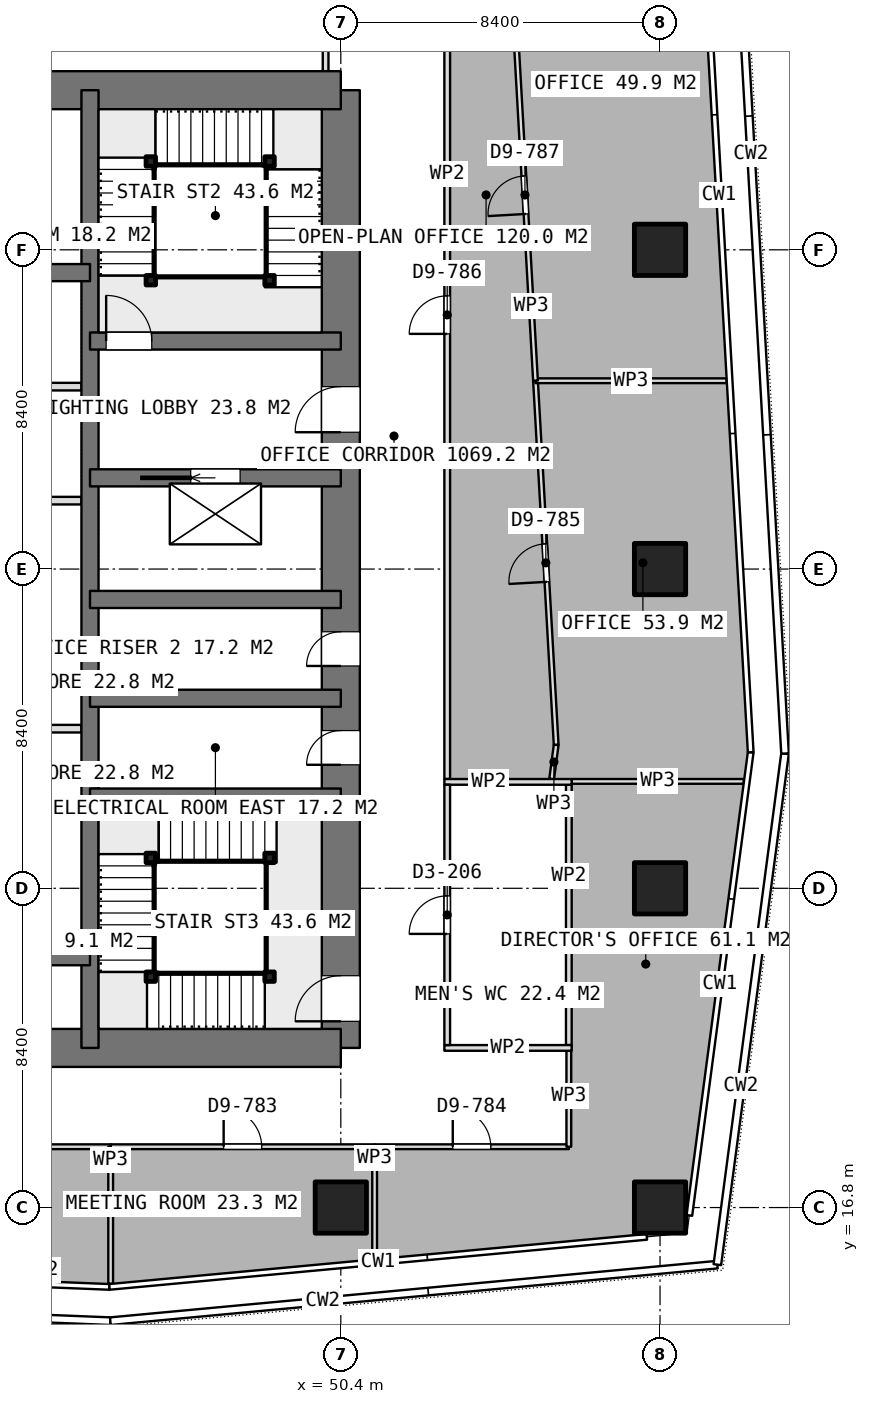
"""IFC4 building model, lengths in metres.
Left out: names, types, materials, properties, quantities, classifications, styles, units other than length and angle.
Written with IfcOpenShell. Run it as: python <this file> out.ifc"""

import sys

from ifc_helpers import new_model, si_unit, direction, frame, frame_2d, origin, origin_2d, place, context, subcontext, project, spatial, rectangle, extrude, element, fill, save


model = new_model("IFC4")
c1 = context("Model", 3, precision=1e-05, world=origin(), true_north=direction((0.0, 1.0)))
c2 = subcontext(c1, "Body", "Model", "MODEL_VIEW")
j1 = project(units=[si_unit("LENGTHUNIT", "METRE"), si_unit("PLANEANGLEUNIT", "RADIAN")], contexts=[c1])
p1 = place(None, origin())
s1 = spatial("IfcSite", under=j1, at=p1, CompositionType="ELEMENT")
p2 = place(p1, origin())
s2 = spatial("IfcBuilding", under=s1, at=p2, CompositionType="ELEMENT")
p3 = place(p2, frame((0.0, 0.0, 195.2)))
s3 = spatial("IfcBuildingStorey", under=s2, at=p3, CompositionType="ELEMENT", Elevation=195.2)
for number, where, z_axis, x_axis in (
    (1, (40.0, 21.0, 0.0), (0.0, 0.0, 1.0), (1.0, 0.0, 0.0)),
    (2, (40.0, 46.2, 0.0), (0.0, 0.0, 1.0), (1.0, 0.0, 0.0)),
):
    element("IfcWall", number, at=place(p3, frame(where, z_axis=z_axis, x_axis=x_axis)), inside=s3, PredefinedType="SHEAR", context=c2, shape_type="SweptSolid", body=[
        extrude(rectangle(XDim=10.4, YDim=1.0, at=frame_2d((5.2, 0.0))), origin(), (0.0, 0.0, 1.0), 3.75),
    ])
p4 = place(p3, frame((50.4, 21.0, 0.0), z_axis=(0.0, 0.0, 1.0), x_axis=(0.0, 1.0, 0.0)))
e3 = element("IfcWall", 3, at=p4, inside=s3, PredefinedType="SHEAR", context=c2, shape_type="SweptSolid", body=[
    extrude(rectangle(XDim=25.2, YDim=1.0, at=frame_2d((12.6, 0.0))), origin(), (0.0, 0.0, 1.0), 3.75),
])
p5 = place(p4, frame((16.2, 0.0, 0.0)))
e4 = element("IfcOpeningElement", 4, at=p5, cuts=e3, PredefinedType="OPENING", context=c2, shape_type="SweptSolid", body=[
    extrude(rectangle(XDim=1.2, YDim=2.1, at=frame_2d((0.6, 1.05))), frame((0.0, 0.51, 0.0), z_axis=(0.0, -1.0, 0.0), x_axis=(1.0, 0.0, 0.0)), (0.0, 0.0, 1.0), 1.02),
])
p6 = place(p4, frame((10.05, 0.0, 0.0)))
e5 = element("IfcOpeningElement", 5, at=p6, cuts=e3, PredefinedType="OPENING", context=c2, shape_type="SweptSolid", body=[
    extrude(rectangle(XDim=0.9, YDim=2.1, at=frame_2d((0.45, 1.05))), frame((0.0, 0.51, 0.0), z_axis=(0.0, -1.0, 0.0), x_axis=(1.0, 0.0, 0.0)), (0.0, 0.0, 1.0), 1.02),
])
p7 = place(p4, frame((7.45, 0.0, 0.0)))
e6 = element("IfcOpeningElement", 6, at=p7, cuts=e3, PredefinedType="OPENING", context=c2, shape_type="SweptSolid", body=[
    extrude(rectangle(XDim=0.9, YDim=2.1, at=frame_2d((0.45, 1.05))), frame((0.0, 0.51, 0.0), z_axis=(0.0, -1.0, 0.0), x_axis=(1.0, 0.0, 0.0)), (0.0, 0.0, 1.0), 1.02),
])
p8 = place(p4, frame((0.7, 0.0, 0.0)))
e7 = element("IfcOpeningElement", 7, at=p8, cuts=e3, PredefinedType="OPENING", context=c2, shape_type="SweptSolid", body=[
    extrude(rectangle(XDim=1.2, YDim=2.1, at=frame_2d((0.6, 1.05))), frame((0.0, 0.51, 0.0), z_axis=(0.0, -1.0, 0.0), x_axis=(1.0, 0.0, 0.0)), (0.0, 0.0, 1.0), 1.02),
])
p9 = place(p3, frame((43.8, 21.0, 0.0), z_axis=(0.0, 0.0, 1.0), x_axis=(0.0, 1.0, 0.0)))
e8 = element("IfcWall", 8, at=p9, inside=s3, PredefinedType="SHEAR", context=c2, shape_type="SweptSolid", body=[
    extrude(rectangle(XDim=25.2, YDim=0.45, at=frame_2d((12.6, 0.0))), origin(), (0.0, 0.0, 1.0), 3.75),
])
for number, where, z_axis, x_axis in (
    (9, (40.0, 23.4, 0.0), (0.0, 0.0, 1.0), (1.0, 0.0, 0.0)),
    (10, (40.0, 41.4, 0.0), (0.0, 0.0, 1.0), (1.0, 0.0, 0.0)),
):
    element("IfcWall", number, at=place(p3, frame(where, z_axis=z_axis, x_axis=x_axis)), inside=s3, PredefinedType="SHEAR", context=c2, shape_type="SweptSolid", body=[
        extrude(rectangle(XDim=3.8, YDim=0.45, at=frame_2d((1.9, 0.0))), origin(), (0.0, 0.0, 1.0), 3.75),
    ])
for number, where, z_axis, x_axis in (
    (11, (43.8, 27.6, 0.0), (0.0, 0.0, 1.0), (1.0, 0.0, 0.0)),
    (12, (43.8, 30.2, 0.0), (0.0, 0.0, 1.0), (1.0, 0.0, 0.0)),
    (13, (43.8, 32.8, 0.0), (0.0, 0.0, 1.0), (1.0, 0.0, 0.0)),
):
    element("IfcWall", number, at=place(p3, frame(where, z_axis=z_axis, x_axis=x_axis)), inside=s3, PredefinedType="SHEAR", context=c2, shape_type="SweptSolid", body=[
        extrude(rectangle(XDim=6.6, YDim=0.45, at=frame_2d((3.3, 0.0))), origin(), (0.0, 0.0, 1.0), 3.75),
    ])
p10 = place(p3, frame((43.8, 36.0, 0.0), z_axis=(0.0, 0.0, 1.0), x_axis=(1.0, 0.0, 0.0)))
e14 = element("IfcWall", 14, at=p10, inside=s3, PredefinedType="SHEAR", context=c2, shape_type="SweptSolid", body=[
    extrude(rectangle(XDim=6.6, YDim=0.45, at=frame_2d((3.3, 0.0))), origin(), (0.0, 0.0, 1.0), 3.75),
])
p11 = place(p10, frame((2.65, 0.0, 0.0)))
e15 = element("IfcOpeningElement", 15, at=p11, cuts=e14, PredefinedType="OPENING", context=c2, shape_type="SweptSolid", body=[
    extrude(rectangle(XDim=1.3, YDim=2.1, at=frame_2d((0.65, 1.05))), frame((0.0, 0.235, 0.0), z_axis=(0.0, -1.0, 0.0), x_axis=(1.0, 0.0, 0.0)), (0.0, 0.0, 1.0), 0.47),
])
p12 = place(p3, frame((43.8, 39.6, 0.0), z_axis=(0.0, 0.0, 1.0), x_axis=(1.0, 0.0, 0.0)))
e16 = element("IfcWall", 16, at=p12, inside=s3, PredefinedType="SHEAR", context=c2, shape_type="SweptSolid", body=[
    extrude(rectangle(XDim=6.6, YDim=0.45, at=frame_2d((3.3, 0.0))), origin(), (0.0, 0.0, 1.0), 3.75),
])
p13 = place(p12, frame((0.425, 0.0, 0.0)))
e17 = element("IfcOpeningElement", 17, at=p13, cuts=e16, PredefinedType="OPENING", context=c2, shape_type="SweptSolid", body=[
    extrude(rectangle(XDim=1.2, YDim=2.1, at=frame_2d((0.6, 1.05))), frame((0.0, 0.235, 0.0), z_axis=(0.0, -1.0, 0.0), x_axis=(1.0, 0.0, 0.0)), (0.0, 0.0, 1.0), 0.47),
])
for number, where, z_axis, x_axis in (
    (18, (50.4, 16.8, 0.0), (0.0, 0.0, 1.0), (1.0, 0.0, 0.0)),
    (19, (58.8, 16.8, 0.0), (0.0, 0.0, 1.0), (1.0, 0.0, 0.0)),
    (20, (58.8, 25.2, 0.0), (0.0, 0.0, 1.0), (1.0, 0.0, 0.0)),
    (21, (58.8, 33.6, 0.0), (0.0, 0.0, 1.0), (1.0, 0.0, 0.0)),
    (22, (58.8, 42.0, 0.0), (0.0, 0.0, 1.0), (1.0, 0.0, 0.0)),
):
    element("IfcColumn", number, at=place(p3, frame(where, z_axis=z_axis, x_axis=x_axis)), inside=s3, PredefinedType="COLUMN", context=c2, shape_type="SweptSolid", body=[
        extrude(rectangle(XDim=1.35, YDim=1.35, at=origin_2d()), origin(), (0.0, 0.0, 1.0), 3.75),
    ])
for number, where, z_axis, x_axis in (
    (23, (40.225, 29.4, 0.0), (0.0, 0.0, 1.0), (1.0, 0.0, 0.0)),
    (24, (40.225, 35.4, 0.0), (0.0, 0.0, 1.0), (1.0, 0.0, 0.0)),
    (25, (40.225, 38.4, 0.0), (0.0, 0.0, 1.0), (1.0, 0.0, 0.0)),
):
    element("IfcWall", number, at=place(p3, frame(where, z_axis=z_axis, x_axis=x_axis)), inside=s3, PredefinedType="PARTITIONING", context=c2, shape_type="SweptSolid", body=[
        extrude(rectangle(XDim=3.35, YDim=0.2, at=frame_2d((1.675, 0.0))), origin(), (0.0, 0.0, 1.0), 3.5),
    ])
p14 = place(p3, frame((50.0, 46.7, 0.0), z_axis=(0.0, 0.0, 1.0), x_axis=(0.0, 1.0, 0.0)))
e26 = element("IfcWall", 26, at=p14, inside=s3, PredefinedType="PARTITIONING", context=c2, shape_type="SweptSolid", body=[
    extrude(rectangle(XDim=2.625, YDim=0.15, at=frame_2d((1.312, 0.0))), origin(), (0.0, 0.0, 1.0), 3.5),
])
for number, where, z_axis, x_axis in (
    (27, (53.125, 21.0, 0.0), (0.0, 0.0, 1.0), (1.0, 0.0, 0.0)),
    (28, (53.125, 28.0, 0.0), (0.0, 0.0, 1.0), (1.0, 0.0, 0.0)),
):
    element("IfcWall", number, at=place(p3, frame(where, z_axis=z_axis, x_axis=x_axis)), inside=s3, PredefinedType="PARTITIONING", context=c2, shape_type="SweptSolid", body=[
        extrude(rectangle(XDim=3.35, YDim=0.15, at=frame_2d((1.675, 0.0))), origin(), (0.0, 0.0, 1.0), 3.5),
    ])
p15 = place(p3, frame((53.2, 21.075, 0.0), z_axis=(0.0, 0.0, 1.0), x_axis=(0.0, 1.0, 0.0)))
e29 = element("IfcWall", 29, at=p15, inside=s3, PredefinedType="PARTITIONING", context=c2, shape_type="SweptSolid", body=[
    extrude(rectangle(XDim=6.85, YDim=0.15, at=frame_2d((3.425, 0.0))), origin(), (0.0, 0.0, 1.0), 3.5),
])
p16 = place(p15, frame((2.925, 0.0, 0.0)))
e30 = element("IfcOpeningElement", 30, at=p16, cuts=e29, PredefinedType="OPENING", context=c2, shape_type="SweptSolid", body=[
    extrude(rectangle(XDim=1.0, YDim=2.1, at=frame_2d((0.5, 1.05))), frame((0.0, 0.085, 0.0), z_axis=(0.0, -1.0, 0.0), x_axis=(1.0, 0.0, 0.0)), (0.0, 0.0, 1.0), 0.17),
])
p17 = place(p3, frame((56.4, 21.075, 0.0), z_axis=(0.0, 0.0, 1.0), x_axis=(0.0, 1.0, 0.0)))
e31 = element("IfcWall", 31, at=p17, inside=s3, PredefinedType="PARTITIONING", context=c2, shape_type="SweptSolid", body=[
    extrude(rectangle(XDim=6.85, YDim=0.15, at=frame_2d((3.425, 0.0))), origin(), (0.0, 0.0, 1.0), 3.5),
])
p18 = place(p3, frame((34.531, 18.4, 0.0), z_axis=(0.0, 0.0, 1.0), x_axis=(1.0, 0.0, 0.0)))
e32 = element("IfcWall", 32, at=p18, inside=s3, PredefinedType="PARTITIONING", context=c2, shape_type="SweptSolid", body=[
    extrude(rectangle(XDim=9.813, YDim=0.125, at=frame_2d((4.906, 0.0))), origin(), (0.0, 0.0, 1.0), 3.5),
])
p19 = place(p18, frame((4.407, 0.0, 0.0)))
e33 = element("IfcOpeningElement", 33, at=p19, cuts=e32, PredefinedType="OPENING", context=c2, shape_type="SweptSolid", body=[
    extrude(rectangle(XDim=1.0, YDim=2.1, at=frame_2d((0.5, 1.05))), frame((0.0, 0.073, 0.0), z_axis=(0.0, -1.0, 0.0), x_axis=(1.0, 0.0, 0.0)), (0.0, 0.0, 1.0), 0.145),
])
p20 = place(p3, frame((44.344, 18.4, 0.0), z_axis=(0.0, 0.0, 1.0), x_axis=(0.0, -1.0, 0.0)))
e34 = element("IfcWall", 34, at=p20, inside=s3, PredefinedType="PARTITIONING", context=c2, shape_type="SweptSolid", body=[
    extrude(rectangle(XDim=3.605, YDim=0.125, at=frame_2d((1.802, 0.0))), origin(), (0.0, 0.0, 1.0), 3.5),
])
p21 = place(p3, frame((44.345, 18.4, 0.0), z_axis=(0.0, 0.0, 1.0), x_axis=(1.0, 0.0, 0.0)))
e35 = element("IfcWall", 35, at=p21, inside=s3, PredefinedType="PARTITIONING", context=c2, shape_type="SweptSolid", body=[
    extrude(rectangle(XDim=6.945, YDim=0.125, at=frame_2d((3.473, 0.0))), origin(), (0.0, 0.0, 1.0), 3.5),
])
p22 = place(p21, frame((2.972, 0.0, 0.0)))
e36 = element("IfcOpeningElement", 36, at=p22, cuts=e35, PredefinedType="OPENING", context=c2, shape_type="SweptSolid", body=[
    extrude(rectangle(XDim=1.0, YDim=2.1, at=frame_2d((0.5, 1.05))), frame((0.0, 0.073, 0.0), z_axis=(0.0, -1.0, 0.0), x_axis=(1.0, 0.0, 0.0)), (0.0, 0.0, 1.0), 0.145),
])
p23 = place(p3, frame((51.29, 18.4, 0.0), z_axis=(0.0, 0.0, 1.0), x_axis=(0.0, -1.0, 0.0)))
e37 = element("IfcWall", 37, at=p23, inside=s3, PredefinedType="PARTITIONING", context=c2, shape_type="SweptSolid", body=[
    extrude(rectangle(XDim=2.958, YDim=0.125, at=frame_2d((1.479, 0.0))), origin(), (0.0, 0.0, 1.0), 3.5),
])
p24 = place(p3, frame((51.291, 18.4, 0.0), z_axis=(0.0, 0.0, 1.0), x_axis=(1.0, 0.0, 0.0)))
e38 = element("IfcWall", 38, at=p24, inside=s3, PredefinedType="PARTITIONING", context=c2, shape_type="SweptSolid", body=[
    extrude(rectangle(XDim=5.109, YDim=0.125, at=frame_2d((2.554, 0.0))), origin(), (0.0, 0.0, 1.0), 3.5),
])
p25 = place(p24, frame((2.055, 0.0, 0.0)))
e39 = element("IfcOpeningElement", 39, at=p25, cuts=e38, PredefinedType="OPENING", context=c2, shape_type="SweptSolid", body=[
    extrude(rectangle(XDim=1.0, YDim=2.1, at=frame_2d((0.5, 1.05))), frame((0.0, 0.073, 0.0), z_axis=(0.0, -1.0, 0.0), x_axis=(1.0, 0.0, 0.0)), (0.0, 0.0, 1.0), 0.145),
])
p26 = place(p3, frame((56.4, 18.4, 0.0), z_axis=(0.0, 0.0, 1.0), x_axis=(0.0, 1.0, 0.0)))
e40 = element("IfcWall", 40, at=p26, inside=s3, PredefinedType="PARTITIONING", context=c2, shape_type="SweptSolid", body=[
    extrude(rectangle(XDim=2.675, YDim=0.125, at=frame_2d((1.337, 0.0))), origin(), (0.0, 0.0, 1.0), 3.5),
])
p27 = place(p3, frame((56.476, 28.013, 0.0), z_axis=(0.0, 0.0, 1.0), x_axis=(1.0, 0.0, 0.0)))
e41 = element("IfcWall", 41, at=p27, inside=s3, PredefinedType="PARTITIONING", context=c2, shape_type="SweptSolid", body=[
    extrude(rectangle(XDim=4.528, YDim=0.125, at=frame_2d((2.264, 0.0))), origin(), (0.0, 0.0, 1.0), 3.5),
])
p28 = place(p3, frame((55.948, 28.075, 0.0), z_axis=(0.0, 0.0, 1.0), x_axis=(0.131403700017, 0.991328940172, 0.0)))
e42 = element("IfcWall", 42, at=p28, inside=s3, PredefinedType="PARTITIONING", context=c2, shape_type="SweptSolid", body=[
    extrude(rectangle(XDim=0.905, YDim=0.125, at=frame_2d((0.452, 0.0))), origin(), (0.0, 0.0, 1.0), 3.5),
])
p29 = place(p3, frame((56.067, 28.972, 0.0), z_axis=(0.0, 0.0, 1.0), x_axis=(-0.056670220537, 0.99839295175, 0.0)))
e43 = element("IfcWall", 43, at=p29, inside=s3, PredefinedType="PARTITIONING", context=c2, shape_type="SweptSolid", body=[
    extrude(rectangle(XDim=9.598, YDim=0.125, at=frame_2d((4.799, 0.0))), origin(), (0.0, 0.0, 1.0), 3.5),
])
p30 = place(p29, frame((4.299, 0.0, 0.0)))
e44 = element("IfcOpeningElement", 44, at=p30, cuts=e43, PredefinedType="OPENING", context=c2, shape_type="SweptSolid", body=[
    extrude(rectangle(XDim=1.0, YDim=2.1, at=frame_2d((0.5, 1.05))), frame((0.0, 0.073, 0.0), z_axis=(0.0, -1.0, 0.0), x_axis=(1.0, 0.0, 0.0)), (0.0, 0.0, 1.0), 0.145),
])
p31 = place(p3, frame((55.523, 38.555, 0.0), z_axis=(0.0, 0.0, 1.0), x_axis=(1.0, 0.0, 0.0)))
e45 = element("IfcWall", 45, at=p31, inside=s3, PredefinedType="PARTITIONING", context=c2, shape_type="SweptSolid", body=[
    extrude(rectangle(XDim=5.028, YDim=0.125, at=frame_2d((2.514, 0.0))), origin(), (0.0, 0.0, 1.0), 3.5),
])
p32 = place(p3, frame((55.523, 38.556, 0.0), z_axis=(0.0, 0.0, 1.0), x_axis=(-0.056678391694, 0.99839248791, 0.0)))
e46 = element("IfcWall", 46, at=p32, inside=s3, PredefinedType="PARTITIONING", context=c2, shape_type="SweptSolid", body=[
    extrude(rectangle(XDim=9.791, YDim=0.125, at=frame_2d((4.896, 0.0))), origin(), (0.0, 0.0, 1.0), 3.5),
])
p33 = place(p32, frame((4.395, 0.0, 0.0)))
e47 = element("IfcOpeningElement", 47, at=p33, cuts=e46, PredefinedType="OPENING", context=c2, shape_type="SweptSolid", body=[
    extrude(rectangle(XDim=1.0, YDim=2.1, at=frame_2d((0.5, 1.05))), frame((0.0, 0.073, 0.0), z_axis=(0.0, -1.0, 0.0), x_axis=(1.0, 0.0, 0.0)), (0.0, 0.0, 1.0), 0.145),
])
p34 = place(p3, frame((53.2, 28.075, 0.0), z_axis=(0.0, 0.0, 1.0), x_axis=(0.0, 1.0, 0.0)))
e48 = element("IfcWall", 48, at=p34, inside=s3, PredefinedType="PARTITIONING", context=c2, shape_type="SweptSolid", body=[
    extrude(rectangle(XDim=24.5, YDim=0.15, at=frame_2d((12.25, 0.0))), origin(), (0.0, 0.0, 1.0), 3.5),
])
p35 = place(p34, frame((11.713, 0.0, 0.0)))
e49 = element("IfcOpeningElement", 49, at=p35, cuts=e48, PredefinedType="OPENING", context=c2, shape_type="SweptSolid", body=[
    extrude(rectangle(XDim=1.0, YDim=2.1, at=frame_2d((0.5, 1.05))), frame((0.0, 0.085, 0.0), z_axis=(0.0, -1.0, 0.0), x_axis=(1.0, 0.0, 0.0)), (0.0, 0.0, 1.0), 0.17),
])
for number, where, z_axis, x_axis in (
    (50, (45.4, 41.2, 0.0), (0.0, 0.0, 1.0), (1.0, 0.0, 0.0)),
    (51, (45.4, 44.325, 0.0), (0.0, 0.0, 1.0), (1.0, 0.0, 0.0)),
    (52, (48.525, 44.325, 0.0), (0.0, 0.0, 1.0), (1.0, 0.0, 0.0)),
    (53, (48.525, 41.2, 0.0), (0.0, 0.0, 1.0), (1.0, 0.0, 0.0)),
    (54, (48.525, 22.875, 0.0), (0.0, 0.0, 1.0), (1.0, 0.0, 0.0)),
    (55, (45.4, 22.875, 0.0), (0.0, 0.0, 1.0), (1.0, 0.0, 0.0)),
    (56, (45.4, 26.0, 0.0), (0.0, 0.0, 1.0), (1.0, 0.0, 0.0)),
    (57, (48.525, 26.0, 0.0), (0.0, 0.0, 1.0), (1.0, 0.0, 0.0)),
):
    element("IfcColumn", number, at=place(p3, frame(where, z_axis=z_axis, x_axis=x_axis)), inside=s3, PredefinedType="COLUMN", context=c2, shape_type="SweptSolid", body=[
        extrude(rectangle(XDim=0.25, YDim=0.25, at=origin_2d()), origin(), (0.0, 0.0, 1.0), 3.75),
    ])
p36 = place(p5, origin())
e58 = element("IfcDoor", 58, at=p36, inside=s3, OperationType="SINGLE_SWING_LEFT", PredefinedType="DOOR", context=c2, shape_type="SweptSolid", body=[
    extrude(rectangle(XDim=1.2, YDim=2.1, at=frame_2d((0.6, 1.05))), frame((0.0, 0.025, 0.0), z_axis=(0.0, -1.0, 0.0), x_axis=(1.0, 0.0, 0.0)), (0.0, 0.0, 1.0), 0.05),
])
fill(e4, e58)
p37 = place(p6, origin())
e59 = element("IfcDoor", 59, at=p37, inside=s3, OperationType="SINGLE_SWING_LEFT", PredefinedType="DOOR", context=c2, shape_type="SweptSolid", body=[
    extrude(rectangle(XDim=0.9, YDim=2.1, at=frame_2d((0.45, 1.05))), frame((0.0, 0.025, 0.0), z_axis=(0.0, -1.0, 0.0), x_axis=(1.0, 0.0, 0.0)), (0.0, 0.0, 1.0), 0.05),
])
fill(e5, e59)
p38 = place(p7, origin())
e60 = element("IfcDoor", 60, at=p38, inside=s3, OperationType="SINGLE_SWING_LEFT", PredefinedType="DOOR", context=c2, shape_type="SweptSolid", body=[
    extrude(rectangle(XDim=0.9, YDim=2.1, at=frame_2d((0.45, 1.05))), frame((0.0, 0.025, 0.0), z_axis=(0.0, -1.0, 0.0), x_axis=(1.0, 0.0, 0.0)), (0.0, 0.0, 1.0), 0.05),
])
fill(e6, e60)
p39 = place(p11, origin())
e61 = element("IfcDoor", 61, at=p39, inside=s3, OperationType="SLIDING_TO_LEFT", PredefinedType="USERDEFINED", context=c2, shape_type="SweptSolid", body=[
    extrude(rectangle(XDim=1.3, YDim=2.1, at=frame_2d((0.65, 1.05))), frame((0.0, 0.025, 0.0), z_axis=(0.0, -1.0, 0.0), x_axis=(1.0, 0.0, 0.0)), (0.0, 0.0, 1.0), 0.05),
])
fill(e15, e61)
p40 = place(p16, origin())
e62 = element("IfcDoor", 62, at=p40, inside=s3, OperationType="SINGLE_SWING_LEFT", PredefinedType="DOOR", context=c2, shape_type="SweptSolid", body=[
    extrude(rectangle(XDim=1.0, YDim=2.1, at=frame_2d((0.5, 1.05))), frame((0.0, 0.025, 0.0), z_axis=(0.0, -1.0, 0.0), x_axis=(1.0, 0.0, 0.0)), (0.0, 0.0, 1.0), 0.05),
])
fill(e30, e62)
p41 = place(p22, origin())
e63 = element("IfcDoor", 63, at=p41, inside=s3, OperationType="SINGLE_SWING_LEFT", PredefinedType="DOOR", context=c2, shape_type="SweptSolid", body=[
    extrude(rectangle(XDim=1.0, YDim=2.1, at=frame_2d((0.5, 1.05))), frame((0.0, 0.025, 0.0), z_axis=(0.0, -1.0, 0.0), x_axis=(1.0, 0.0, 0.0)), (0.0, 0.0, 1.0), 0.05),
])
fill(e36, e63)
p42 = place(p25, origin())
e64 = element("IfcDoor", 64, at=p42, inside=s3, OperationType="SINGLE_SWING_LEFT", PredefinedType="DOOR", context=c2, shape_type="SweptSolid", body=[
    extrude(rectangle(XDim=1.0, YDim=2.1, at=frame_2d((0.5, 1.05))), frame((0.0, 0.025, 0.0), z_axis=(0.0, -1.0, 0.0), x_axis=(1.0, 0.0, 0.0)), (0.0, 0.0, 1.0), 0.05),
])
fill(e39, e64)
p43 = place(p30, origin())
e65 = element("IfcDoor", 65, at=p43, inside=s3, OperationType="SINGLE_SWING_LEFT", PredefinedType="DOOR", context=c2, shape_type="SweptSolid", body=[
    extrude(rectangle(XDim=1.0, YDim=2.1, at=frame_2d((0.5, 1.05))), frame((0.0, 0.025, 0.0), z_axis=(0.0, -1.0, 0.0), x_axis=(1.0, 0.0, 0.0)), (0.0, 0.0, 1.0), 0.05),
])
fill(e44, e65)
p44 = place(p33, origin())
e66 = element("IfcDoor", 66, at=p44, inside=s3, OperationType="SINGLE_SWING_LEFT", PredefinedType="DOOR", context=c2, shape_type="SweptSolid", body=[
    extrude(rectangle(XDim=1.0, YDim=2.1, at=frame_2d((0.5, 1.05))), frame((0.0, 0.025, 0.0), z_axis=(0.0, -1.0, 0.0), x_axis=(1.0, 0.0, 0.0)), (0.0, 0.0, 1.0), 0.05),
])
fill(e47, e66)
p45 = place(p35, origin())
e67 = element("IfcDoor", 67, at=p45, inside=s3, OperationType="SINGLE_SWING_LEFT", PredefinedType="DOOR", context=c2, shape_type="SweptSolid", body=[
    extrude(rectangle(XDim=1.0, YDim=2.1, at=frame_2d((0.5, 1.05))), frame((0.0, 0.025, 0.0), z_axis=(0.0, -1.0, 0.0), x_axis=(1.0, 0.0, 0.0)), (0.0, 0.0, 1.0), 0.05),
])
fill(e49, e67)
p46 = place(p13, origin())
e68 = element("IfcDoor", 68, at=p46, inside=s3, OperationType="SINGLE_SWING_RIGHT", PredefinedType="DOOR", context=c2, shape_type="SweptSolid", body=[
    extrude(rectangle(XDim=1.2, YDim=2.1, at=frame_2d((0.6, 1.05))), frame((0.0, 0.025, 0.0), z_axis=(0.0, -1.0, 0.0), x_axis=(1.0, 0.0, 0.0)), (0.0, 0.0, 1.0), 0.05),
])
fill(e17, e68)
p47 = place(p8, origin())
e69 = element("IfcDoor", 69, at=p47, inside=s3, OperationType="SINGLE_SWING_RIGHT", PredefinedType="DOOR", context=c2, shape_type="SweptSolid", body=[
    extrude(rectangle(XDim=1.2, YDim=2.1, at=frame_2d((0.6, 1.05))), frame((0.0, 0.025, 0.0), z_axis=(0.0, -1.0, 0.0), x_axis=(1.0, 0.0, 0.0)), (0.0, 0.0, 1.0), 0.05),
])
fill(e7, e69)
save(model, sys.argv[1])
